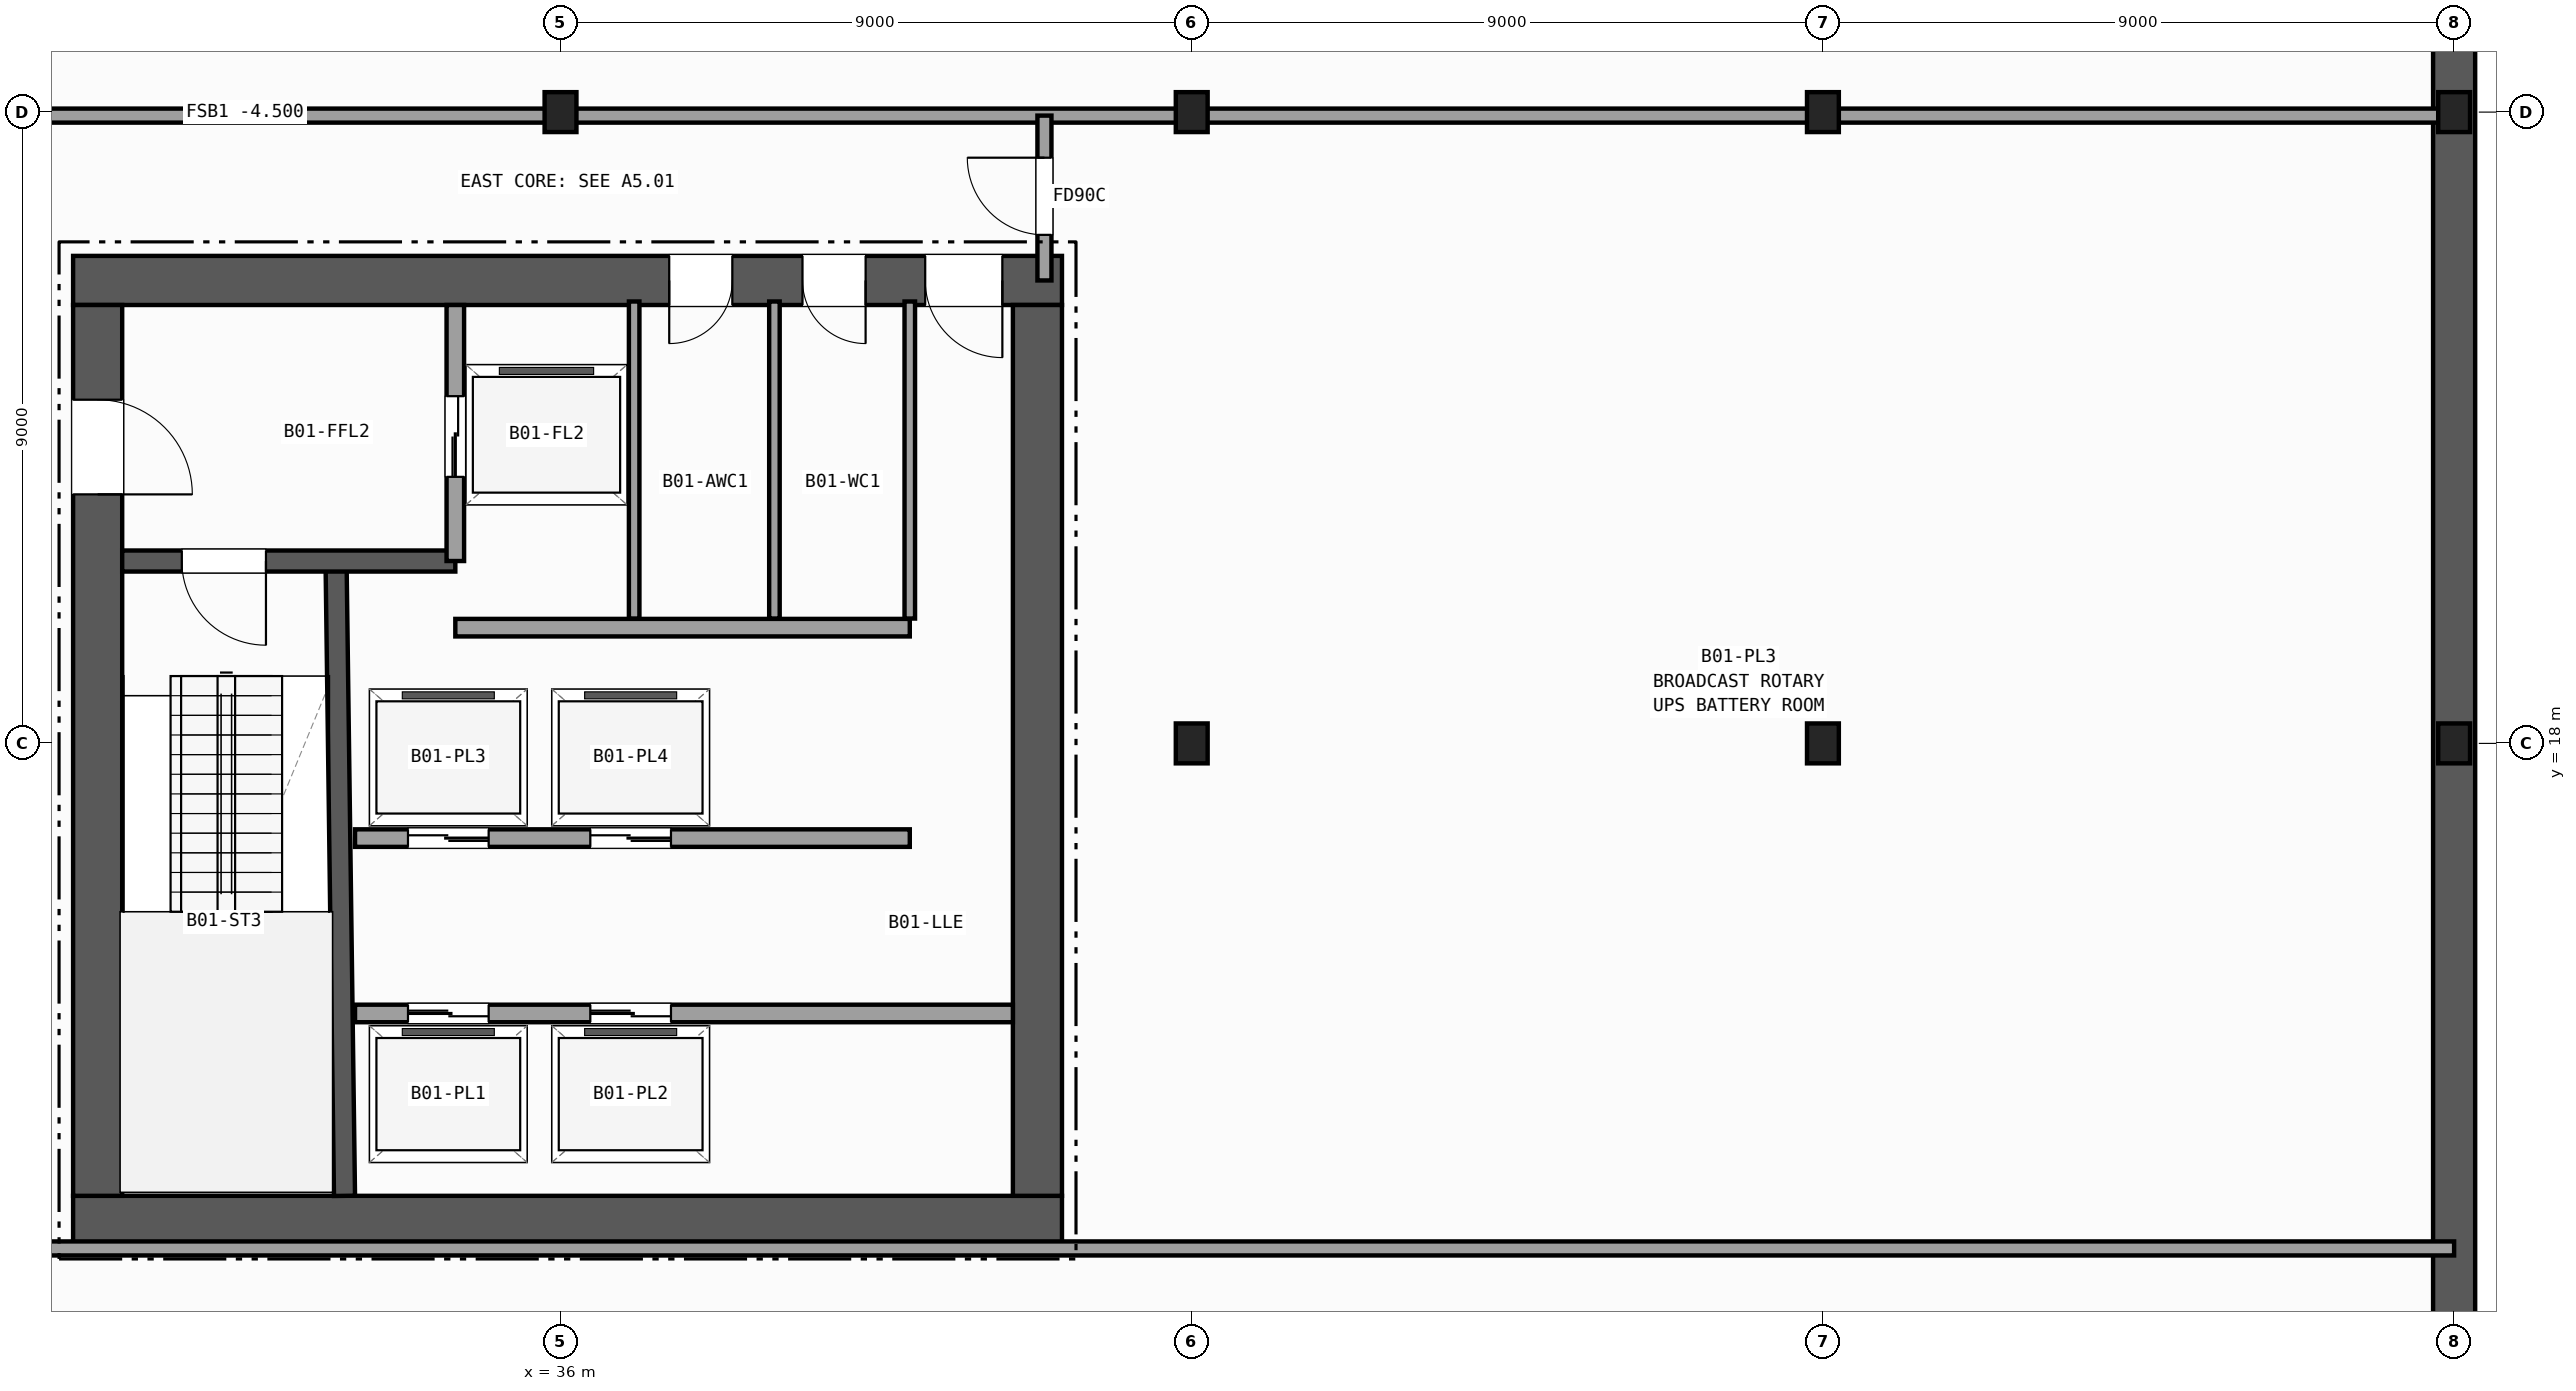
"""IFC4 building model, lengths in metres.
Left out: names, types, materials, properties, quantities, classifications, styles, units other than length and angle.
Written with IfcOpenShell. Run it as: python <this file> out.ifc"""

import sys

from ifc_helpers import new_model, si_unit, direction, frame, frame_2d, origin, origin_2d, place, context, subcontext, project, spatial, rectangle, i_section, extrude, element, fill, save


model = new_model("IFC4")
c1 = context("Model", 3, precision=1e-05, world=origin(), true_north=direction((0.0, 1.0)))
c2 = subcontext(c1, "Body", "Model", "MODEL_VIEW")
j1 = project(units=[si_unit("LENGTHUNIT", "METRE"), si_unit("PLANEANGLEUNIT", "RADIAN")], contexts=[c1])
p1 = place(None, origin())
s1 = spatial("IfcSite", under=j1, at=p1, CompositionType="ELEMENT")
p2 = place(p1, origin())
s2 = spatial("IfcBuilding", under=s1, at=p2, CompositionType="ELEMENT")
p3 = place(p2, frame((0.0, 0.0, -4.5)))
s3 = spatial("IfcBuildingStorey", under=s2, at=p3, CompositionType="ELEMENT", Elevation=-4.5)
for number, where, z_axis, x_axis in (
    (1, (36.0, 27.0, 0.0), (0.0, 0.0, 1.0), (1.0, 0.0, 0.0)),
    (2, (45.0, 18.0, 0.0), (0.0, 0.0, 1.0), (1.0, 0.0, 0.0)),
    (3, (45.0, 27.0, 0.0), (0.0, 0.0, 1.0), (1.0, 0.0, 0.0)),
    (4, (54.0, 18.0, 0.0), (0.0, 0.0, 1.0), (1.0, 0.0, 0.0)),
    (5, (54.0, 27.0, 0.0), (0.0, 0.0, 1.0), (1.0, 0.0, 0.0)),
    (6, (63.0, 18.0, 0.0), (0.0, 0.0, 1.0), (1.0, 0.0, 0.0)),
    (7, (63.0, 27.0, 0.0), (0.0, 0.0, 1.0), (1.0, 0.0, 0.0)),
):
    element("IfcColumn", number, at=place(p3, frame(where, z_axis=z_axis, x_axis=x_axis)), inside=s3, PredefinedType="COLUMN", context=c2, shape_type="SweptSolid", body=[
        extrude(i_section(OverallWidth=0.454, OverallDepth=0.569, WebThickness=0.078, FlangeThickness=0.125, FilletRadius=0.015, at=origin_2d()), origin(), (0.0, 0.0, 1.0), 4.5),
    ])
p4 = place(p3, frame((63.0, 54.3, 0.0), z_axis=(0.0, 0.0, 1.0), x_axis=(0.0, -1.0, 0.0)))
e8 = element("IfcWall", 8, at=p4, inside=s3, PredefinedType="SOLIDWALL", context=c2, shape_type="SweptSolid", body=[
    extrude(rectangle(XDim=54.6, YDim=0.6, at=frame_2d((27.3, 0.0))), origin(), (0.0, 0.0, 1.0), 4.18),
])
p5 = place(p3, frame((29.05, 11.2, 0.0), z_axis=(0.0, 0.0, 1.0), x_axis=(1.0, 0.0, 0.0)))
e9 = element("IfcWall", 9, at=p5, inside=s3, PredefinedType="SHEAR", context=c2, shape_type="SweptSolid", body=[
    extrude(rectangle(XDim=14.1, YDim=0.7, at=frame_2d((7.05, 0.0))), origin(), (0.0, 0.0, 1.0), 4.18),
])
p6 = place(p3, frame((43.15, 24.6, 0.0), z_axis=(0.0, 0.0, 1.0), x_axis=(-1.0, 0.0, 0.0)))
e10 = element("IfcWall", 10, at=p6, inside=s3, PredefinedType="SHEAR", context=c2, shape_type="SweptSolid", body=[
    extrude(rectangle(XDim=14.1, YDim=0.7, at=frame_2d((7.05, 0.0))), origin(), (0.0, 0.0, 1.0), 4.18),
])
p7 = place(p6, frame((0.85, 0.0, 0.0)))
e11 = element("IfcOpeningElement", 11, at=p7, cuts=e10, PredefinedType="OPENING", context=c2, shape_type="SweptSolid", body=[
    extrude(rectangle(XDim=1.1, YDim=2.15, at=frame_2d((0.55, 1.075))), frame((0.0, 0.36, 0.0), z_axis=(0.0, -1.0, 0.0), x_axis=(1.0, 0.0, 0.0)), (0.0, 0.0, 1.0), 0.72),
])
p8 = place(p6, frame((2.8, 0.0, 0.0)))
e12 = element("IfcOpeningElement", 12, at=p8, cuts=e10, PredefinedType="OPENING", context=c2, shape_type="SweptSolid", body=[
    extrude(rectangle(XDim=0.9, YDim=2.1, at=frame_2d((0.45, 1.05))), frame((0.0, 0.36, 0.0), z_axis=(0.0, -1.0, 0.0), x_axis=(1.0, 0.0, 0.0)), (0.0, 0.0, 1.0), 0.72),
])
p9 = place(p6, frame((4.7, 0.0, 0.0)))
e13 = element("IfcOpeningElement", 13, at=p9, cuts=e10, PredefinedType="OPENING", context=c2, shape_type="SweptSolid", body=[
    extrude(rectangle(XDim=0.9, YDim=2.1, at=frame_2d((0.45, 1.05))), frame((0.0, 0.36, 0.0), z_axis=(0.0, -1.0, 0.0), x_axis=(1.0, 0.0, 0.0)), (0.0, 0.0, 1.0), 0.72),
])
p10 = place(p3, frame((29.4, 24.25, 0.0), z_axis=(0.0, 0.0, 1.0), x_axis=(0.0, -1.0, 0.0)))
e14 = element("IfcWall", 14, at=p10, inside=s3, PredefinedType="SHEAR", context=c2, shape_type="SweptSolid", body=[
    extrude(rectangle(XDim=12.7, YDim=0.7, at=frame_2d((6.35, 0.0))), origin(), (0.0, 0.0, 1.0), 4.18),
])
p11 = place(p10, frame((1.35, 0.0, 0.0)))
e15 = element("IfcOpeningElement", 15, at=p11, cuts=e14, PredefinedType="OPENING", context=c2, shape_type="SweptSolid", body=[
    extrude(rectangle(XDim=1.35, YDim=2.15, at=frame_2d((0.675, 1.075))), frame((0.0, 0.36, 0.0), z_axis=(0.0, -1.0, 0.0), x_axis=(1.0, 0.0, 0.0)), (0.0, 0.0, 1.0), 0.72),
])
p12 = place(p3, frame((42.8, 11.55, 0.0), z_axis=(0.0, 0.0, 1.0), x_axis=(0.0, 1.0, 0.0)))
e16 = element("IfcWall", 16, at=p12, inside=s3, PredefinedType="SHEAR", context=c2, shape_type="SweptSolid", body=[
    extrude(rectangle(XDim=12.7, YDim=0.7, at=frame_2d((6.35, 0.0))), origin(), (0.0, 0.0, 1.0), 4.18),
])
p13 = place(p3, frame((32.92, 11.55, 0.0), z_axis=(0.0, 0.0, 1.0), x_axis=(-0.01331804616, 0.99991131089, 0.0)))
e17 = element("IfcWall", 17, at=p13, inside=s3, PredefinedType="SHEAR", context=c2, shape_type="SweptSolid", body=[
    extrude(rectangle(XDim=9.001, YDim=0.3, at=frame_2d((4.5, 0.0))), origin(), (0.0, 0.0, 1.0), 4.18),
])
p14 = place(p3, frame((34.5, 20.6, 0.0), z_axis=(0.0, 0.0, 1.0), x_axis=(-1.0, 0.0, 0.0)))
e18 = element("IfcWall", 18, at=p14, inside=s3, PredefinedType="SHEAR", context=c2, shape_type="SweptSolid", body=[
    extrude(rectangle(XDim=4.75, YDim=0.3, at=frame_2d((2.375, 0.0))), origin(), (0.0, 0.0, 1.0), 4.18),
])
p15 = place(p14, frame((2.7, 0.0, 0.0)))
e19 = element("IfcOpeningElement", 19, at=p15, cuts=e18, PredefinedType="OPENING", context=c2, shape_type="SweptSolid", body=[
    extrude(rectangle(XDim=1.2, YDim=2.15, at=frame_2d((0.6, 1.075))), frame((0.0, 0.16, 0.0), z_axis=(0.0, -1.0, 0.0), x_axis=(1.0, 0.0, 0.0)), (0.0, 0.0, 1.0), 0.32),
])
p16 = place(p3, frame((34.5, 20.6, 0.0), z_axis=(0.0, 0.0, 1.0), x_axis=(0.0, 1.0, 0.0)))
e20 = element("IfcWall", 20, at=p16, inside=s3, PredefinedType="PARTITIONING", context=c2, shape_type="SweptSolid", body=[
    extrude(rectangle(XDim=3.65, YDim=0.25, at=frame_2d((1.825, 0.0))), origin(), (0.0, 0.0, 1.0), 4.18),
])
p17 = place(p16, frame((1.2, 0.0, 0.0)))
e21 = element("IfcOpeningElement", 21, at=p17, cuts=e20, PredefinedType="OPENING", context=c2, shape_type="SweptSolid", body=[
    extrude(rectangle(XDim=1.15, YDim=2.15, at=frame_2d((0.575, 1.075))), frame((0.0, 0.135, 0.0), z_axis=(0.0, -1.0, 0.0), x_axis=(1.0, 0.0, 0.0)), (0.0, 0.0, 1.0), 0.27),
])
p18 = place(p3, frame((34.5, 19.65, 0.0), z_axis=(0.0, 0.0, 1.0), x_axis=(1.0, 0.0, 0.0)))
e22 = element("IfcWall", 22, at=p18, inside=s3, PredefinedType="PARTITIONING", context=c2, shape_type="SweptSolid", body=[
    extrude(rectangle(XDim=6.48, YDim=0.25, at=frame_2d((3.24, 0.0))), origin(), (0.0, 0.0, 1.0), 4.18),
])
p19 = place(p3, frame((33.07, 14.15, 0.0), z_axis=(0.0, 0.0, 1.0), x_axis=(1.0, 0.0, 0.0)))
e23 = element("IfcWall", 23, at=p19, inside=s3, PredefinedType="PARTITIONING", context=c2, shape_type="SweptSolid", body=[
    extrude(rectangle(XDim=9.38, YDim=0.25, at=frame_2d((4.69, 0.0))), origin(), (0.0, 0.0, 1.0), 4.18),
])
p20 = place(p19, frame((0.755, 0.0, 0.0)))
e24 = element("IfcOpeningElement", 24, at=p20, cuts=e23, PredefinedType="OPENING", context=c2, shape_type="SweptSolid", body=[
    extrude(rectangle(XDim=1.15, YDim=2.15, at=frame_2d((0.575, 1.075))), frame((0.0, 0.135, 0.0), z_axis=(0.0, -1.0, 0.0), x_axis=(1.0, 0.0, 0.0)), (0.0, 0.0, 1.0), 0.27),
])
p21 = place(p19, frame((3.355, 0.0, 0.0)))
e25 = element("IfcOpeningElement", 25, at=p21, cuts=e23, PredefinedType="OPENING", context=c2, shape_type="SweptSolid", body=[
    extrude(rectangle(XDim=1.15, YDim=2.15, at=frame_2d((0.575, 1.075))), frame((0.0, 0.135, 0.0), z_axis=(0.0, -1.0, 0.0), x_axis=(1.0, 0.0, 0.0)), (0.0, 0.0, 1.0), 0.27),
])
p22 = place(p3, frame((40.98, 16.65, 0.0), z_axis=(0.0, 0.0, 1.0), x_axis=(-1.0, 0.0, 0.0)))
e26 = element("IfcWall", 26, at=p22, inside=s3, PredefinedType="PARTITIONING", context=c2, shape_type="SweptSolid", body=[
    extrude(rectangle(XDim=7.91, YDim=0.25, at=frame_2d((3.955, 0.0))), origin(), (0.0, 0.0, 1.0), 4.18),
])
p23 = place(p22, frame((6.005, 0.0, 0.0)))
e27 = element("IfcOpeningElement", 27, at=p23, cuts=e26, PredefinedType="OPENING", context=c2, shape_type="SweptSolid", body=[
    extrude(rectangle(XDim=1.15, YDim=2.15, at=frame_2d((0.575, 1.075))), frame((0.0, 0.135, 0.0), z_axis=(0.0, -1.0, 0.0), x_axis=(1.0, 0.0, 0.0)), (0.0, 0.0, 1.0), 0.27),
])
p24 = place(p22, frame((3.405, 0.0, 0.0)))
e28 = element("IfcOpeningElement", 28, at=p24, cuts=e26, PredefinedType="OPENING", context=c2, shape_type="SweptSolid", body=[
    extrude(rectangle(XDim=1.15, YDim=2.15, at=frame_2d((0.575, 1.075))), frame((0.0, 0.135, 0.0), z_axis=(0.0, -1.0, 0.0), x_axis=(1.0, 0.0, 0.0)), (0.0, 0.0, 1.0), 0.27),
])
for number, where, z_axis, x_axis in (
    (29, (37.05, 19.78, 0.0), (0.0, 0.0, 1.0), (0.0, 1.0, 0.0)),
    (30, (39.05, 19.78, 0.0), (0.0, 0.0, 1.0), (0.0, 1.0, 0.0)),
    (31, (40.98, 19.78, 0.0), (0.0, 0.0, 1.0), (0.0, 1.0, 0.0)),
):
    element("IfcWall", number, at=place(p3, frame(where, z_axis=z_axis, x_axis=x_axis)), inside=s3, PredefinedType="PARTITIONING", context=c2, shape_type="SweptSolid", body=[
        extrude(rectangle(XDim=4.52, YDim=0.15, at=frame_2d((2.26, 0.0))), origin(), (0.0, 0.0, 1.0), 4.18),
    ])
p25 = place(p3, frame((27.1, 26.95, 0.0), z_axis=(0.0, 0.0, 1.0), x_axis=(1.0, 0.0, 0.0)))
e32 = element("IfcWall", 32, at=p25, inside=s3, PredefinedType="PARTITIONING", context=c2, shape_type="SweptSolid", body=[
    extrude(rectangle(XDim=35.9, YDim=0.2, at=frame_2d((17.95, 0.0))), origin(), (0.0, 0.0, 1.0), 3.233),
])
p26 = place(p3, frame((42.9, 24.6, 0.0), z_axis=(0.0, 0.0, 1.0), x_axis=(0.0, 1.0, 0.0)))
e33 = element("IfcWall", 33, at=p26, inside=s3, PredefinedType="PARTITIONING", context=c2, shape_type="SweptSolid", body=[
    extrude(rectangle(XDim=2.35, YDim=0.2, at=frame_2d((1.175, 0.0))), origin(), (0.0, 0.0, 1.0), 3.233),
])
p27 = place(p26, frame((0.65, 0.0, 0.0)))
e34 = element("IfcOpeningElement", 34, at=p27, cuts=e33, PredefinedType="OPENING", context=c2, shape_type="SweptSolid", body=[
    extrude(rectangle(XDim=1.1, YDim=2.15, at=frame_2d((0.55, 1.075))), frame((0.0, 0.11, 0.0), z_axis=(0.0, -1.0, 0.0), x_axis=(1.0, 0.0, 0.0)), (0.0, 0.0, 1.0), 0.22),
])
p28 = place(p3, frame((24.65, 10.8, 0.0), z_axis=(0.0, 0.0, 1.0), x_axis=(1.0, 0.0, 0.0)))
e35 = element("IfcWall", 35, at=p28, inside=s3, PredefinedType="PARTITIONING", context=c2, shape_type="SweptSolid", body=[
    extrude(rectangle(XDim=38.35, YDim=0.2, at=frame_2d((19.175, 0.0))), origin(), (0.0, 0.0, 1.0), 3.305),
])
p29 = place(p28, frame((2.0, 0.0, 0.0)))
e36 = element("IfcOpeningElement", 36, at=p29, cuts=e35, PredefinedType="OPENING", context=c2, shape_type="SweptSolid", body=[
    extrude(rectangle(XDim=1.1, YDim=2.15, at=frame_2d((0.55, 1.075))), frame((0.0, 0.11, 0.0), z_axis=(0.0, -1.0, 0.0), x_axis=(1.0, 0.0, 0.0)), (0.0, 0.0, 1.0), 0.22),
])
p30 = place(p15, origin())
e37 = element("IfcDoor", 37, at=p30, inside=s3, OperationType="SINGLE_SWING_LEFT", PredefinedType="DOOR", context=c2, shape_type="SweptSolid", body=[
    extrude(rectangle(XDim=1.2, YDim=2.15, at=frame_2d((0.6, 1.075))), frame((0.0, 0.025, 0.0), z_axis=(0.0, -1.0, 0.0), x_axis=(1.0, 0.0, 0.0)), (0.0, 0.0, 1.0), 0.05),
])
fill(e19, e37)
p31 = place(p11, origin())
e38 = element("IfcDoor", 38, at=p31, inside=s3, OperationType="SINGLE_SWING_RIGHT", PredefinedType="DOOR", context=c2, shape_type="SweptSolid", body=[
    extrude(rectangle(XDim=1.35, YDim=2.15, at=frame_2d((0.675, 1.075))), frame((0.0, 0.025, 0.0), z_axis=(0.0, -1.0, 0.0), x_axis=(1.0, 0.0, 0.0)), (0.0, 0.0, 1.0), 0.05),
])
fill(e15, e38)
p32 = place(p7, origin())
e39 = element("IfcDoor", 39, at=p32, inside=s3, OperationType="SINGLE_SWING_LEFT", PredefinedType="DOOR", context=c2, shape_type="SweptSolid", body=[
    extrude(rectangle(XDim=1.1, YDim=2.15, at=frame_2d((0.55, 1.075))), frame((0.0, 0.025, 0.0), z_axis=(0.0, -1.0, 0.0), x_axis=(1.0, 0.0, 0.0)), (0.0, 0.0, 1.0), 0.05),
])
fill(e11, e39)
p33 = place(p8, origin())
e40 = element("IfcDoor", 40, at=p33, inside=s3, OperationType="SINGLE_SWING_LEFT", PredefinedType="DOOR", context=c2, shape_type="SweptSolid", body=[
    extrude(rectangle(XDim=0.9, YDim=2.1, at=frame_2d((0.45, 1.05))), frame((0.0, 0.025, 0.0), z_axis=(0.0, -1.0, 0.0), x_axis=(1.0, 0.0, 0.0)), (0.0, 0.0, 1.0), 0.05),
])
fill(e12, e40)
p34 = place(p9, origin())
e41 = element("IfcDoor", 41, at=p34, inside=s3, OperationType="SINGLE_SWING_RIGHT", PredefinedType="DOOR", context=c2, shape_type="SweptSolid", body=[
    extrude(rectangle(XDim=0.9, YDim=2.1, at=frame_2d((0.45, 1.05))), frame((0.0, 0.025, 0.0), z_axis=(0.0, -1.0, 0.0), x_axis=(1.0, 0.0, 0.0)), (0.0, 0.0, 1.0), 0.05),
])
fill(e13, e41)
p35 = place(p17, origin())
e42 = element("IfcDoor", 42, at=p35, inside=s3, OperationType="DOUBLE_DOOR_SLIDING", PredefinedType="DOOR", context=c2, shape_type="SweptSolid", body=[
    extrude(rectangle(XDim=1.15, YDim=2.15, at=frame_2d((0.575, 1.075))), frame((0.0, 0.025, 0.0), z_axis=(0.0, -1.0, 0.0), x_axis=(1.0, 0.0, 0.0)), (0.0, 0.0, 1.0), 0.05),
])
fill(e21, e42)
p36 = place(p20, origin())
e43 = element("IfcDoor", 43, at=p36, inside=s3, OperationType="DOUBLE_DOOR_SLIDING", PredefinedType="DOOR", context=c2, shape_type="SweptSolid", body=[
    extrude(rectangle(XDim=1.15, YDim=2.15, at=frame_2d((0.575, 1.075))), frame((0.0, 0.025, 0.0), z_axis=(0.0, -1.0, 0.0), x_axis=(1.0, 0.0, 0.0)), (0.0, 0.0, 1.0), 0.05),
])
fill(e24, e43)
p37 = place(p21, origin())
e44 = element("IfcDoor", 44, at=p37, inside=s3, OperationType="DOUBLE_DOOR_SLIDING", PredefinedType="DOOR", context=c2, shape_type="SweptSolid", body=[
    extrude(rectangle(XDim=1.15, YDim=2.15, at=frame_2d((0.575, 1.075))), frame((0.0, 0.025, 0.0), z_axis=(0.0, -1.0, 0.0), x_axis=(1.0, 0.0, 0.0)), (0.0, 0.0, 1.0), 0.05),
])
fill(e25, e44)
p38 = place(p23, origin())
e45 = element("IfcDoor", 45, at=p38, inside=s3, OperationType="DOUBLE_DOOR_SLIDING", PredefinedType="DOOR", context=c2, shape_type="SweptSolid", body=[
    extrude(rectangle(XDim=1.15, YDim=2.15, at=frame_2d((0.575, 1.075))), frame((0.0, 0.025, 0.0), z_axis=(0.0, -1.0, 0.0), x_axis=(1.0, 0.0, 0.0)), (0.0, 0.0, 1.0), 0.05),
])
fill(e27, e45)
p39 = place(p24, origin())
e46 = element("IfcDoor", 46, at=p39, inside=s3, OperationType="DOUBLE_DOOR_SLIDING", PredefinedType="DOOR", context=c2, shape_type="SweptSolid", body=[
    extrude(rectangle(XDim=1.15, YDim=2.15, at=frame_2d((0.575, 1.075))), frame((0.0, 0.025, 0.0), z_axis=(0.0, -1.0, 0.0), x_axis=(1.0, 0.0, 0.0)), (0.0, 0.0, 1.0), 0.05),
])
fill(e28, e46)
p40 = place(p27, origin())
e47 = element("IfcDoor", 47, at=p40, inside=s3, OperationType="SINGLE_SWING_RIGHT", PredefinedType="DOOR", context=c2, shape_type="SweptSolid", body=[
    extrude(rectangle(XDim=1.1, YDim=2.15, at=frame_2d((0.55, 1.075))), frame((0.0, 0.025, 0.0), z_axis=(0.0, -1.0, 0.0), x_axis=(1.0, 0.0, 0.0)), (0.0, 0.0, 1.0), 0.05),
])
fill(e34, e47)
save(model, sys.argv[1])
